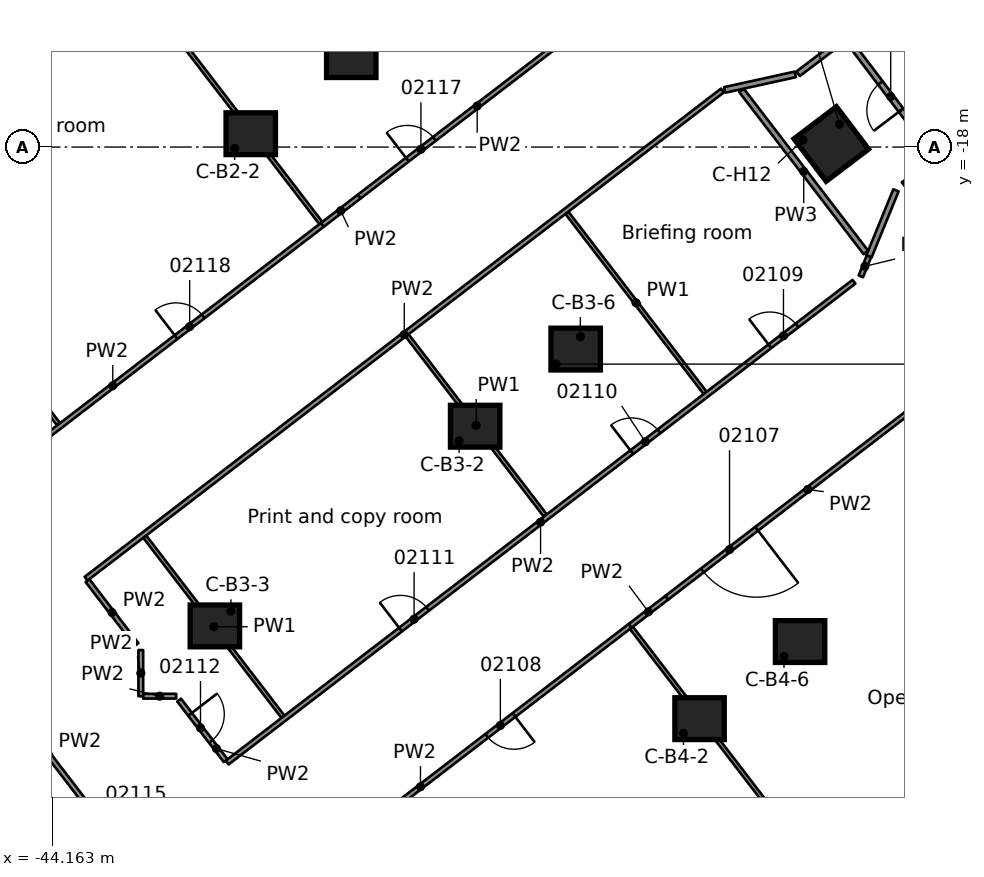
"""IFC4 building model, lengths in metres.
Left out: names, types, materials, properties, quantities, classifications, styles, units other than length and angle.
Written with IfcOpenShell. Run it as: python <this file> out.ifc"""

import sys

from ifc_helpers import new_model, si_unit, direction, frame, frame_2d, origin, origin_2d, place, context, subcontext, project, spatial, rectangle, extrude, element, fill, save


model = new_model("IFC4")
c1 = context("Model", 3, precision=1e-05, world=origin(), true_north=direction((0.0, 1.0)))
c2 = subcontext(c1, "Body", "Model", "MODEL_VIEW")
j1 = project(units=[si_unit("LENGTHUNIT", "METRE"), si_unit("PLANEANGLEUNIT", "RADIAN")], contexts=[c1])
p1 = place(None, origin())
s1 = spatial("IfcSite", under=j1, at=p1, CompositionType="ELEMENT")
p2 = place(p1, origin())
s2 = spatial("IfcBuilding", under=s1, at=p2, CompositionType="ELEMENT")
p3 = place(p2, frame((0.0, 0.0, 10.5)))
s3 = spatial("IfcBuildingStorey", under=s2, at=p3, CompositionType="ELEMENT", Elevation=10.5)
p4 = place(p3, frame((-38.935, -17.649, -1.0), z_axis=(0.0, 0.0, 1.0), x_axis=(0.707106781187, 0.707106781187, 0.0)))
e1 = element("IfcColumn", 1, at=p4, inside=s3, PredefinedType="COLUMN", context=c2, shape_type="SweptSolid", body=[
    extrude(rectangle(XDim=3.25, YDim=3.25, at=origin_2d()), origin(), (0.0, 0.0, 1.0), 1.0),
])
p5 = place(p3, frame((-45.784, -22.905, -1.0), z_axis=(0.0, 0.0, 1.0), x_axis=(0.707106781187, 0.707106781187, 0.0)))
e2 = element("IfcColumn", 2, at=p5, inside=s3, PredefinedType="COLUMN", context=c2, shape_type="SweptSolid", body=[
    extrude(rectangle(XDim=3.4, YDim=3.4, at=origin_2d()), origin(), (0.0, 0.0, 1.0), 1.0),
])
for number, where, z_axis, x_axis in (
    (3, (-36.29, -15.62, -1.0), (0.0, 0.0, 1.0), (0.707, 0.707, 0.0)),
    (4, (-33.03, -25.345, -1.0), (0.0, 0.0, 1.0), (0.707, 0.707, 0.0)),
):
    element("IfcColumn", number, at=place(p3, frame(where, z_axis=z_axis, x_axis=x_axis)), inside=s3, PredefinedType="COLUMN", context=c2, shape_type="SweptSolid", body=[
        extrude(rectangle(XDim=3.25, YDim=3.25, at=origin_2d()), origin(), (0.0, 0.0, 1.0), 1.0),
    ])
p6 = place(p3, frame((-39.879, -30.6, -1.0), z_axis=(0.0, 0.0, 1.0), x_axis=(0.707106781187, 0.707106781187, 0.0)))
e5 = element("IfcColumn", 5, at=p6, inside=s3, PredefinedType="COLUMN", context=c2, shape_type="SweptSolid", body=[
    extrude(rectangle(XDim=3.4, YDim=3.4, at=origin_2d()), origin(), (0.0, 0.0, 1.0), 1.0),
])
for number, where, z_axis, x_axis in (
    (6, (-30.385, -23.316, -1.0), (0.0, 0.0, 1.0), (0.707, 0.707, 0.0)),
    (7, (-27.125, -33.04, -1.0), (0.0, 0.0, 1.0), (0.707, 0.707, 0.0)),
    (8, (-24.48, -31.011, -1.0), (0.0, 0.0, 1.0), (0.707, 0.707, 0.0)),
):
    element("IfcColumn", number, at=place(p3, frame(where, z_axis=z_axis, x_axis=x_axis)), inside=s3, PredefinedType="COLUMN", context=c2, shape_type="SweptSolid", body=[
        extrude(rectangle(XDim=3.25, YDim=3.25, at=origin_2d()), origin(), (0.0, 0.0, 1.0), 1.0),
    ])
for number, where, z_axis, x_axis in (
    (9, (-20.99, -28.333, -1.0), (0.0, 0.0, 1.0), (0.707, 0.707, 0.0)),
    (10, (-23.659, -17.919, -1.0), (0.0, 0.0, 1.0), (0.707, 0.707, 0.0)),
):
    element("IfcColumn", number, at=place(p3, frame(where, z_axis=z_axis, x_axis=x_axis)), inside=s3, PredefinedType="COLUMN", context=c2, shape_type="SweptSolid", body=[
        extrude(rectangle(XDim=3.4, YDim=3.4, at=origin_2d()), origin(), (0.0, 0.0, 1.0), 1.0),
    ])
for number, where, z_axis, x_axis in (
    (11, (-38.935, -17.649, 0.0), (0.0, 0.0, 1.0), (1.0, 0.0, 0.0)),
    (12, (-36.29, -15.62, 0.0), (0.0, 0.0, 1.0), (1.0, 0.0, 0.0)),
    (13, (-33.03, -25.345, 0.0), (0.0, 0.0, 1.0), (1.0, 0.0, 0.0)),
    (14, (-39.879, -30.6, 0.0), (0.0, 0.0, 1.0), (1.0, 0.0, 0.0)),
    (15, (-30.385, -23.316, 0.0), (0.0, 0.0, 1.0), (1.0, 0.0, 0.0)),
    (16, (-27.125, -33.04, 0.0), (0.0, 0.0, 1.0), (1.0, 0.0, 0.0)),
    (17, (-24.48, -31.011, 0.0), (0.0, 0.0, 1.0), (1.0, 0.0, 0.0)),
):
    element("IfcColumn", number, at=place(p3, frame(where, z_axis=z_axis, x_axis=x_axis)), inside=s3, PredefinedType="COLUMN", context=c2, shape_type="SweptSolid", body=[
        extrude(rectangle(XDim=1.3, YDim=1.1, at=origin_2d()), origin(), (0.0, 0.0, 1.0), 5.0),
    ])
p7 = place(p3, frame((-23.659, -17.919, 0.0), z_axis=(0.0, 0.0, 1.0), x_axis=(-0.797162615875, -0.603764659327, 0.0)))
e18 = element("IfcColumn", 18, at=p7, inside=s3, PredefinedType="COLUMN", context=c2, shape_type="SweptSolid", body=[
    extrude(rectangle(XDim=1.4, YDim=1.4, at=origin_2d()), origin(), (0.0, 0.0, 1.0), 5.0),
])
p8 = place(p3, frame((-20.903, -18.246, 0.0), z_axis=(0.0, 0.0, 1.0), x_axis=(-0.603799066409, 0.797136555054, 0.0)))
e19 = element("IfcWall", 19, at=p8, inside=s3, PredefinedType="PARTITIONING", context=c2, shape_type="SweptSolid", body=[
    extrude(rectangle(XDim=3.849, YDim=0.15, at=frame_2d((1.924, 0.0))), origin(), (0.0, 0.0, 1.0), 4.58),
])
p9 = place(p8, frame((1.525, 0.0, 0.0)))
e20 = element("IfcOpeningElement", 20, at=p9, cuts=e19, PredefinedType="OPENING", context=c2, shape_type="SweptSolid", body=[
    extrude(rectangle(XDim=0.9, YDim=2.1, at=frame_2d((0.45, 1.05))), frame((0.0, 0.085, 0.0), z_axis=(0.0, -1.0, 0.0), x_axis=(1.0, 0.0, 0.0)), (0.0, 0.0, 1.0), 0.17),
])
p10 = place(p3, frame((-40.264, -39.191, 0.0), z_axis=(0.0, 0.0, 1.0), x_axis=(-0.608717571556, 0.793386991373, 0.0)))
e21 = element("IfcWall", 21, at=p10, inside=s3, PredefinedType="PARTITIONING", context=c2, shape_type="SweptSolid", body=[
    extrude(rectangle(XDim=13.169, YDim=0.125, at=frame_2d((6.584, 0.0))), origin(), (0.0, 0.0, 1.0), 4.58),
])
p11 = place(p10, frame((9.431, 0.0, 0.0)))
e22 = element("IfcOpeningElement", 22, at=p11, cuts=e21, PredefinedType="OPENING", context=c2, shape_type="SweptSolid", body=[
    extrude(rectangle(XDim=0.9, YDim=2.1, at=frame_2d((0.45, 1.05))), frame((0.0, 0.073, 0.0), z_axis=(0.0, -1.0, 0.0), x_axis=(1.0, 0.0, 0.0)), (0.0, 0.0, 1.0), 0.145),
])
p12 = place(p10, frame((2.781, 0.0, 0.0)))
e23 = element("IfcOpeningElement", 23, at=p12, cuts=e21, PredefinedType="OPENING", context=c2, shape_type="SweptSolid", body=[
    extrude(rectangle(XDim=0.9, YDim=2.1, at=frame_2d((0.45, 1.05))), frame((0.0, 0.073, 0.0), z_axis=(0.0, -1.0, 0.0), x_axis=(1.0, 0.0, 0.0)), (0.0, 0.0, 1.0), 0.145),
])
p13 = place(p3, frame((-43.231, -29.408, 0.0), z_axis=(0.0, 0.0, 1.0), x_axis=(0.608774942854, -0.79334297057, 0.0)))
e24 = element("IfcWall", 24, at=p13, inside=s3, PredefinedType="PARTITIONING", context=c2, shape_type="SweptSolid", body=[
    extrude(rectangle(XDim=2.119, YDim=0.125, at=frame_2d((1.06, 0.0))), origin(), (0.0, 0.0, 1.0), 4.58),
])
p14 = place(p3, frame((-40.82, -32.551, 0.0), z_axis=(0.0, 0.0, 1.0), x_axis=(0.609452676656, -0.792822448545, 0.0)))
e25 = element("IfcWall", 25, at=p14, inside=s3, PredefinedType="PARTITIONING", context=c2, shape_type="SweptSolid", body=[
    extrude(rectangle(XDim=2.012, YDim=0.125, at=frame_2d((1.006, 0.0))), origin(), (0.0, 0.0, 1.0), 4.58),
])
p15 = place(p14, frame((0.473, 0.0, 0.0)))
e26 = element("IfcOpeningElement", 26, at=p15, cuts=e25, PredefinedType="OPENING", context=c2, shape_type="SweptSolid", body=[
    extrude(rectangle(XDim=0.9, YDim=2.1, at=frame_2d((0.45, 1.05))), frame((0.0, 0.073, 0.0), z_axis=(0.0, -1.0, 0.0), x_axis=(1.0, 0.0, 0.0)), (0.0, 0.0, 1.0), 0.145),
])
p16 = place(p3, frame((-52.2, -14.599, 0.0), z_axis=(0.0, 0.0, 1.0), x_axis=(0.608835217765, -0.793296714735, 0.0)))
e27 = element("IfcWall", 27, at=p16, inside=s3, PredefinedType="PARTITIONING", context=c2, shape_type="SweptSolid", body=[
    extrude(rectangle(XDim=13.481, YDim=0.1, at=frame_2d((6.741, 0.0))), origin(), (0.0, 0.0, 1.0), 4.58),
])
p17 = place(p3, frame((-41.724, -28.252, 0.0), z_axis=(0.0, 0.0, 1.0), x_axis=(0.608928252062, -0.793225304589, 0.0)))
e28 = element("IfcWall", 28, at=p17, inside=s3, PredefinedType="PARTITIONING", context=c2, shape_type="SweptSolid", body=[
    extrude(rectangle(XDim=5.973, YDim=0.1, at=frame_2d((2.987, 0.0))), origin(), (0.0, 0.0, 1.0), 4.58),
])
p18 = place(p3, frame((-45.332, -9.26, 0.0), z_axis=(0.0, 0.0, 1.0), x_axis=(0.608825648604, -0.793304058733, 0.0)))
e29 = element("IfcWall", 29, at=p18, inside=s3, PredefinedType="PARTITIONING", context=c2, shape_type="SweptSolid", body=[
    extrude(rectangle(XDim=13.536, YDim=0.1, at=frame_2d((6.768, 0.0))), origin(), (0.0, 0.0, 1.0), 4.58),
])
p19 = place(p3, frame((-34.822, -22.955, 0.0), z_axis=(0.0, 0.0, 1.0), x_axis=(0.608823570319, -0.79330565372, 0.0)))
e30 = element("IfcWall", 30, at=p19, inside=s3, PredefinedType="PARTITIONING", context=c2, shape_type="SweptSolid", body=[
    extrude(rectangle(XDim=5.974, YDim=0.1, at=frame_2d((2.987, 0.0))), origin(), (0.0, 0.0, 1.0), 4.58),
])
p20 = place(p3, frame((-28.917, -30.652, 0.0), z_axis=(0.0, 0.0, 1.0), x_axis=(0.608788953199, -0.793332219478, 0.0)))
e31 = element("IfcWall", 31, at=p20, inside=s3, PredefinedType="PARTITIONING", context=c2, shape_type="SweptSolid", body=[
    extrude(rectangle(XDim=13.535, YDim=0.1, at=frame_2d((6.768, 0.0))), origin(), (0.0, 0.0, 1.0), 4.58),
])
p21 = place(p3, frame((-30.617, -19.729, 0.0), z_axis=(0.0, 0.0, 1.0), x_axis=(0.608902533452, -0.793245047104, 0.0)))
e32 = element("IfcWall", 32, at=p21, inside=s3, PredefinedType="PARTITIONING", context=c2, shape_type="SweptSolid", body=[
    extrude(rectangle(XDim=5.973, YDim=0.1, at=frame_2d((2.986, 0.0))), origin(), (0.0, 0.0, 1.0), 4.58),
])
p22 = place(p3, frame((-26.021, -16.509, 0.0), z_axis=(0.0, 0.0, 1.0), x_axis=(0.608806156611, -0.793319017592, 0.0)))
e33 = element("IfcWall", 33, at=p22, inside=s3, PredefinedType="PARTITIONING", context=c2, shape_type="SweptSolid", body=[
    extrude(rectangle(XDim=5.376, YDim=0.15, at=frame_2d((2.688, 0.0))), origin(), (0.0, 0.0, 1.0), 4.58),
])
p23 = place(p3, frame((-41.766, -32.449, 0.0), z_axis=(0.0, 0.0, 1.0), x_axis=(1.0, 0.0, 0.0)))
e34 = element("IfcWall", 34, at=p23, inside=s3, PredefinedType="PARTITIONING", context=c2, shape_type="SweptSolid", body=[
    extrude(rectangle(XDim=0.869, YDim=0.125, at=frame_2d((0.435, 0.0))), origin(), (0.0, 0.0, 1.0), 4.58),
])
p24 = place(p3, frame((-26.464, -16.497, 0.0), z_axis=(0.0, 0.0, 1.0), x_axis=(0.976601904513, 0.215055155954, 0.0)))
e35 = element("IfcWall", 35, at=p24, inside=s3, PredefinedType="PARTITIONING", context=c2, shape_type="SweptSolid", body=[
    extrude(rectangle(XDim=1.903, YDim=0.15, at=frame_2d((0.951, 0.0))), origin(), (0.0, 0.0, 1.0), 4.58),
])
p25 = place(p3, frame((-21.758, -18.987, 0.0), z_axis=(0.0, 0.0, 1.0), x_axis=(0.797423261737, 0.603420368931, 0.0)))
e36 = element("IfcWall", 36, at=p25, inside=s3, PredefinedType="PARTITIONING", context=c2, shape_type="SweptSolid", body=[
    extrude(rectangle(XDim=1.129, YDim=0.15, at=frame_2d((0.564, 0.0))), origin(), (0.0, 0.0, 1.0), 4.58),
])
p26 = place(p3, frame((-24.532, -16.072, 0.0), z_axis=(0.0, 0.0, 1.0), x_axis=(0.797229566058, 0.603676253469, 0.0)))
e37 = element("IfcWall", 37, at=p26, inside=s3, PredefinedType="PARTITIONING", context=c2, shape_type="SweptSolid", body=[
    extrude(rectangle(XDim=1.581, YDim=0.15, at=frame_2d((0.79, 0.0))), origin(), (0.0, 0.0, 1.0), 4.58),
])
p27 = place(p3, frame((-28.955, -30.6, 0.0), z_axis=(0.0, 0.0, 1.0), x_axis=(0.793590253862, 0.608452552772, 0.0)))
e38 = element("IfcWall", 38, at=p27, inside=s3, PredefinedType="PARTITIONING", context=c2, shape_type="SweptSolid", body=[
    extrude(rectangle(XDim=1.22, YDim=0.125, at=frame_2d((0.61, 0.0))), origin(), (0.0, 0.0, 1.0), 4.58),
])
p28 = place(p3, frame((-28.955, -30.6, 0.0), z_axis=(0.0, 0.0, 1.0), x_axis=(-0.793294727074, -0.608837807627, 0.0)))
e39 = element("IfcWall", 39, at=p28, inside=s3, PredefinedType="PARTITIONING", context=c2, shape_type="SweptSolid", body=[
    extrude(rectangle(XDim=13.9, YDim=0.125, at=frame_2d((6.95, 0.0))), origin(), (0.0, 0.0, 1.0), 4.58),
])
p29 = place(p28, frame((3.851, 0.0, 0.0)))
e40 = element("IfcOpeningElement", 40, at=p29, cuts=e39, PredefinedType="OPENING", context=c2, shape_type="SweptSolid", body=[
    extrude(rectangle(XDim=0.9, YDim=2.1, at=frame_2d((0.45, 1.05))), frame((0.0, 0.073, 0.0), z_axis=(0.0, -1.0, 0.0), x_axis=(1.0, 0.0, 0.0)), (0.0, 0.0, 1.0), 0.145),
])
p30 = place(p28, frame((10.801, 0.0, 0.0)))
e41 = element("IfcOpeningElement", 41, at=p30, cuts=e39, PredefinedType="OPENING", context=c2, shape_type="SweptSolid", body=[
    extrude(rectangle(XDim=0.9, YDim=2.1, at=frame_2d((0.45, 1.05))), frame((0.0, 0.073, 0.0), z_axis=(0.0, -1.0, 0.0), x_axis=(1.0, 0.0, 0.0)), (0.0, 0.0, 1.0), 0.145),
])
p31 = place(p3, frame((-20.567, -24.164, 0.0), z_axis=(0.0, 0.0, 1.0), x_axis=(-0.793345387212, -0.608771793523, 0.0)))
e42 = element("IfcWall", 42, at=p31, inside=s3, PredefinedType="PARTITIONING", context=c2, shape_type="SweptSolid", body=[
    extrude(rectangle(XDim=9.353, YDim=0.125, at=frame_2d((4.677, 0.0))), origin(), (0.0, 0.0, 1.0), 4.58),
])
p32 = place(p31, frame((6.373, 0.0, 0.0)))
e43 = element("IfcOpeningElement", 43, at=p32, cuts=e42, PredefinedType="OPENING", context=c2, shape_type="SweptSolid", body=[
    extrude(rectangle(XDim=1.8, YDim=2.1, at=frame_2d((0.9, 1.05))), frame((0.0, 0.073, 0.0), z_axis=(0.0, -1.0, 0.0), x_axis=(1.0, 0.0, 0.0)), (0.0, 0.0, 1.0), 0.145),
])
p33 = place(p3, frame((-39.556, -34.196, 0.0), z_axis=(0.0, 0.0, 1.0), x_axis=(0.793448872505, 0.608636908773, 0.0)))
e44 = element("IfcWall", 44, at=p33, inside=s3, PredefinedType="PARTITIONING", context=c2, shape_type="SweptSolid", body=[
    extrude(rectangle(XDim=20.788, YDim=0.125, at=frame_2d((10.394, 0.0))), origin(), (0.0, 0.0, 1.0), 4.58),
])
p34 = place(p33, frame((18.0, 0.0, 0.0)))
e45 = element("IfcOpeningElement", 45, at=p34, cuts=e44, PredefinedType="OPENING", context=c2, shape_type="SweptSolid", body=[
    extrude(rectangle(XDim=0.9, YDim=2.1, at=frame_2d((0.45, 1.05))), frame((0.0, 0.073, 0.0), z_axis=(0.0, -1.0, 0.0), x_axis=(1.0, 0.0, 0.0)), (0.0, 0.0, 1.0), 0.145),
])
p35 = place(p33, frame((13.419, 0.0, 0.0)))
e46 = element("IfcOpeningElement", 46, at=p35, cuts=e44, PredefinedType="OPENING", context=c2, shape_type="SweptSolid", body=[
    extrude(rectangle(XDim=0.9, YDim=2.1, at=frame_2d((0.45, 1.05))), frame((0.0, 0.073, 0.0), z_axis=(0.0, -1.0, 0.0), x_axis=(1.0, 0.0, 0.0)), (0.0, 0.0, 1.0), 0.145),
])
p36 = place(p33, frame((5.749, 0.0, 0.0)))
e47 = element("IfcOpeningElement", 47, at=p36, cuts=e44, PredefinedType="OPENING", context=c2, shape_type="SweptSolid", body=[
    extrude(rectangle(XDim=0.9, YDim=2.1, at=frame_2d((0.45, 1.05))), frame((0.0, 0.073, 0.0), z_axis=(0.0, -1.0, 0.0), x_axis=(1.0, 0.0, 0.0)), (0.0, 0.0, 1.0), 0.145),
])
p37 = place(p3, frame((-43.269, -29.358, 0.0), z_axis=(0.0, 0.0, 1.0), x_axis=(0.793439885471, 0.608648624531, 0.0)))
e48 = element("IfcWall", 48, at=p37, inside=s3, PredefinedType="PARTITIONING", context=c2, shape_type="SweptSolid", body=[
    extrude(rectangle(XDim=21.106, YDim=0.125, at=frame_2d((10.553, 0.0))), origin(), (0.0, 0.0, 1.0), 4.58),
])
p38 = place(p3, frame((-48.08, -28.51, 0.0), z_axis=(0.0, 0.0, 1.0), x_axis=(0.793361206696, 0.608751177173, 0.0)))
e49 = element("IfcWall", 49, at=p38, inside=s3, PredefinedType="PARTITIONING", context=c2, shape_type="SweptSolid", body=[
    extrude(rectangle(XDim=13.9, YDim=0.125, at=frame_2d((6.95, 0.0))), origin(), (0.0, 0.0, 1.0), 4.58),
])
p39 = place(p38, frame((2.1, 0.0, 0.0)))
e50 = element("IfcOpeningElement", 50, at=p39, cuts=e49, PredefinedType="OPENING", context=c2, shape_type="SweptSolid", body=[
    extrude(rectangle(XDim=0.9, YDim=2.1, at=frame_2d((0.45, 1.05))), frame((0.0, 0.073, 0.0), z_axis=(0.0, -1.0, 0.0), x_axis=(1.0, 0.0, 0.0)), (0.0, 0.0, 1.0), 0.145),
])
p40 = place(p38, frame((9.051, 0.0, 0.0)))
e51 = element("IfcOpeningElement", 51, at=p40, cuts=e49, PredefinedType="OPENING", context=c2, shape_type="SweptSolid", body=[
    extrude(rectangle(XDim=0.9, YDim=2.1, at=frame_2d((0.45, 1.05))), frame((0.0, 0.073, 0.0), z_axis=(0.0, -1.0, 0.0), x_axis=(1.0, 0.0, 0.0)), (0.0, 0.0, 1.0), 0.145),
])
p41 = place(p3, frame((-36.084, -19.305, 0.0), z_axis=(0.0, 0.0, 1.0), x_axis=(0.793472416576, 0.60860621434, 0.0)))
e52 = element("IfcWall", 52, at=p41, inside=s3, PredefinedType="PARTITIONING", context=c2, shape_type="SweptSolid", body=[
    extrude(rectangle(XDim=7.834, YDim=0.125, at=frame_2d((3.917, 0.0))), origin(), (0.0, 0.0, 1.0), 4.58),
])
p42 = place(p41, frame((1.6, 0.0, 0.0)))
e53 = element("IfcOpeningElement", 53, at=p42, cuts=e52, PredefinedType="OPENING", context=c2, shape_type="SweptSolid", body=[
    extrude(rectangle(XDim=0.9, YDim=2.1, at=frame_2d((0.45, 1.05))), frame((0.0, 0.073, 0.0), z_axis=(0.0, -1.0, 0.0), x_axis=(1.0, 0.0, 0.0)), (0.0, 0.0, 1.0), 0.145),
])
p43 = place(p3, frame((-37.051, -20.048, 0.0), z_axis=(0.0, 0.0, 1.0), x_axis=(0.792906683767, 0.60934308139, 0.0)))
e54 = element("IfcWall", 54, at=p43, inside=s3, PredefinedType="PARTITIONING", context=c2, shape_type="SweptSolid", body=[
    extrude(rectangle(XDim=1.22, YDim=0.125, at=frame_2d((0.61, 0.0))), origin(), (0.0, 0.0, 1.0), 4.58),
])
p44 = place(p3, frame((-22.668, -20.878, 0.0), z_axis=(0.0, 0.0, 1.0), x_axis=(0.378415254767, 0.925635940832, 0.0)))
e55 = element("IfcWall", 55, at=p44, inside=s3, PredefinedType="PARTITIONING", context=c2, shape_type="SweptSolid", body=[
    extrude(rectangle(XDim=1.879, YDim=0.15, at=frame_2d((0.939, 0.0))), origin(), (0.0, 0.0, 1.0), 4.58),
])
p45 = place(p3, frame((-22.881, -21.401, 0.0), z_axis=(0.0, 0.0, 1.0), x_axis=(0.377420478288, 0.926041998275, 0.0)))
e56 = element("IfcWall", 56, at=p45, inside=s3, PredefinedType="PARTITIONING", context=c2, shape_type="SweptSolid", body=[
    extrude(rectangle(XDim=0.565, YDim=0.125, at=frame_2d((0.282, 0.0))), origin(), (0.0, 0.0, 1.0), 4.58),
])
p46 = place(p3, frame((-41.828, -32.449, 0.0), z_axis=(0.0, 0.0, 1.0), x_axis=(0.0, 1.0, 0.0)))
e57 = element("IfcWall", 57, at=p46, inside=s3, PredefinedType="PARTITIONING", context=c2, shape_type="SweptSolid", body=[
    extrude(rectangle(XDim=1.214, YDim=0.125, at=frame_2d((0.607, 0.0))), origin(), (0.0, 0.0, 1.0), 4.58),
])
p47 = place(p32, origin())
e58 = element("IfcDoor", 58, at=p47, inside=s3, OperationType="DOUBLE_DOOR_SINGLE_SWING", PredefinedType="DOOR", context=c2, shape_type="SweptSolid", body=[
    extrude(rectangle(XDim=1.8, YDim=2.1, at=frame_2d((0.9, 1.05))), frame((0.0, 0.025, 0.0), z_axis=(0.0, -1.0, 0.0), x_axis=(1.0, 0.0, 0.0)), (0.0, 0.0, 1.0), 0.05),
])
fill(e43, e58)
p48 = place(p29, origin())
e59 = element("IfcDoor", 59, at=p48, inside=s3, OperationType="SINGLE_SWING_LEFT", PredefinedType="DOOR", context=c2, shape_type="SweptSolid", body=[
    extrude(rectangle(XDim=0.9, YDim=2.1, at=frame_2d((0.45, 1.05))), frame((0.0, 0.025, 0.0), z_axis=(0.0, -1.0, 0.0), x_axis=(1.0, 0.0, 0.0)), (0.0, 0.0, 1.0), 0.05),
])
fill(e40, e59)
p49 = place(p34, origin())
e60 = element("IfcDoor", 60, at=p49, inside=s3, OperationType="SINGLE_SWING_RIGHT", PredefinedType="DOOR", context=c2, shape_type="SweptSolid", body=[
    extrude(rectangle(XDim=0.9, YDim=2.1, at=frame_2d((0.45, 1.05))), frame((0.0, 0.025, 0.0), z_axis=(0.0, -1.0, 0.0), x_axis=(1.0, 0.0, 0.0)), (0.0, 0.0, 1.0), 0.05),
])
fill(e45, e60)
p50 = place(p35, origin())
e61 = element("IfcDoor", 61, at=p50, inside=s3, OperationType="SINGLE_SWING_RIGHT", PredefinedType="DOOR", context=c2, shape_type="SweptSolid", body=[
    extrude(rectangle(XDim=0.9, YDim=2.1, at=frame_2d((0.45, 1.05))), frame((0.0, 0.025, 0.0), z_axis=(0.0, -1.0, 0.0), x_axis=(1.0, 0.0, 0.0)), (0.0, 0.0, 1.0), 0.05),
])
fill(e46, e61)
p51 = place(p36, origin())
e62 = element("IfcDoor", 62, at=p51, inside=s3, OperationType="SINGLE_SWING_LEFT", PredefinedType="DOOR", context=c2, shape_type="SweptSolid", body=[
    extrude(rectangle(XDim=0.9, YDim=2.1, at=frame_2d((0.45, 1.05))), frame((0.0, 0.025, 0.0), z_axis=(0.0, -1.0, 0.0), x_axis=(1.0, 0.0, 0.0)), (0.0, 0.0, 1.0), 0.05),
])
fill(e47, e62)
p52 = place(p15, origin())
e63 = element("IfcDoor", 63, at=p52, inside=s3, OperationType="SINGLE_SWING_LEFT", PredefinedType="DOOR", context=c2, shape_type="SweptSolid", body=[
    extrude(rectangle(XDim=0.9, YDim=2.1, at=frame_2d((0.45, 1.05))), frame((0.0, 0.025, 0.0), z_axis=(0.0, -1.0, 0.0), x_axis=(1.0, 0.0, 0.0)), (0.0, 0.0, 1.0), 0.05),
])
fill(e26, e63)
p53 = place(p42, origin())
e64 = element("IfcDoor", 64, at=p53, inside=s3, OperationType="SINGLE_SWING_LEFT", PredefinedType="DOOR", context=c2, shape_type="SweptSolid", body=[
    extrude(rectangle(XDim=0.9, YDim=2.1, at=frame_2d((0.45, 1.05))), frame((0.0, 0.025, 0.0), z_axis=(0.0, -1.0, 0.0), x_axis=(1.0, 0.0, 0.0)), (0.0, 0.0, 1.0), 0.05),
])
fill(e53, e64)
p54 = place(p40, origin())
e65 = element("IfcDoor", 65, at=p54, inside=s3, OperationType="SINGLE_SWING_RIGHT", PredefinedType="DOOR", context=c2, shape_type="SweptSolid", body=[
    extrude(rectangle(XDim=0.9, YDim=2.1, at=frame_2d((0.45, 1.05))), frame((0.0, 0.025, 0.0), z_axis=(0.0, -1.0, 0.0), x_axis=(1.0, 0.0, 0.0)), (0.0, 0.0, 1.0), 0.05),
])
fill(e51, e65)
p55 = place(p9, origin())
e66 = element("IfcDoor", 66, at=p55, inside=s3, OperationType="SINGLE_SWING_RIGHT", PredefinedType="DOOR", context=c2, shape_type="SweptSolid", body=[
    extrude(rectangle(XDim=0.9, YDim=2.1, at=frame_2d((0.45, 1.05))), frame((0.0, 0.025, 0.0), z_axis=(0.0, -1.0, 0.0), x_axis=(1.0, 0.0, 0.0)), (0.0, 0.0, 1.0), 0.05),
])
fill(e20, e66)
save(model, sys.argv[1])
